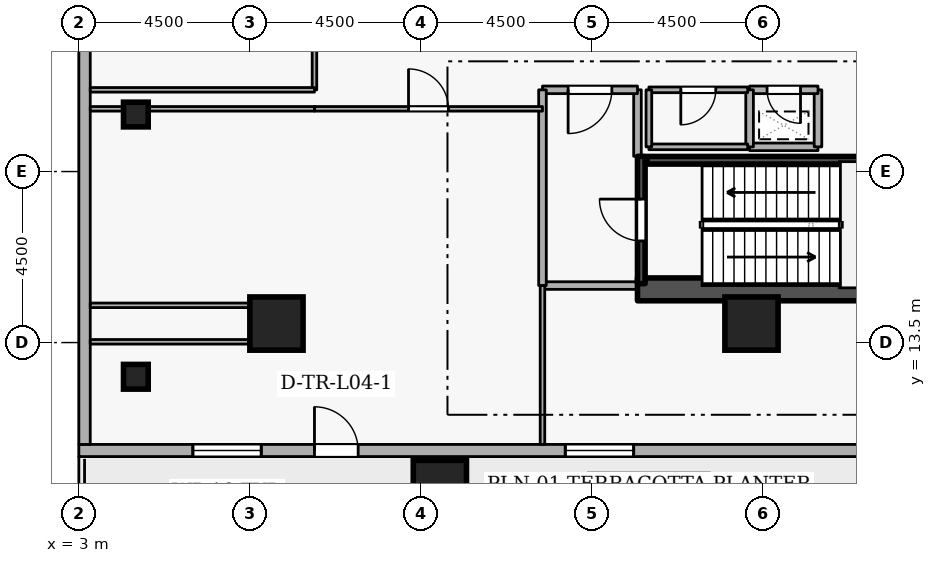
"""IFC4 building model, lengths in metres.
Left out: names, types, materials, properties, quantities, classifications, styles, units other than length and angle.
Written with IfcOpenShell. Run it as: python <this file> out.ifc"""

import sys

from ifc_helpers import new_model, si_unit, direction, frame, frame_2d, origin, origin_2d, place, context, subcontext, project, spatial, rectangle, extrude, element, fill, save


model = new_model("IFC4")
c1 = context("Model", 3, precision=1e-05, world=origin(), true_north=direction((0.0, 1.0)))
c2 = subcontext(c1, "Body", "Model", "MODEL_VIEW")
j1 = project(units=[si_unit("LENGTHUNIT", "METRE"), si_unit("PLANEANGLEUNIT", "RADIAN")], contexts=[c1])
p1 = place(None, origin())
s1 = spatial("IfcSite", under=j1, at=p1, CompositionType="ELEMENT")
p2 = place(p1, origin())
s2 = spatial("IfcBuilding", under=s1, at=p2, CompositionType="ELEMENT")
p3 = place(p2, frame((0.0, 0.0, 18.6)))
s3 = spatial("IfcBuildingStorey", under=s2, at=p3, CompositionType="ELEMENT", Elevation=18.6)
p4 = place(p3, frame((17.7, 14.9, 0.0), z_axis=(0.0, 0.0, 1.0), x_axis=(1.0, 0.0, 0.0)))
e1 = element("IfcWall", 1, at=p4, inside=s3, PredefinedType="SHEAR", context=c2, shape_type="SweptSolid", body=[
    extrude(rectangle(XDim=15.6, YDim=0.6, at=frame_2d((7.8, 0.0))), origin(), (0.0, 0.0, 1.0), 4.5),
])
for number, where, z_axis, x_axis in (
    (2, (12.5, 9.7, 0.0), (0.0, 0.0, 1.0), (1.0, 0.0, 0.0)),
    (3, (8.2, 14.0, 0.0), (0.0, 0.0, 1.0), (1.0, 0.0, 0.0)),
    (4, (20.7, 14.0, 0.0), (0.0, 0.0, 1.0), (1.0, 0.0, 0.0)),
):
    element("IfcColumn", number, at=place(p3, frame(where, z_axis=z_axis, x_axis=x_axis)), inside=s3, PredefinedType="COLUMN", context=c2, shape_type="SweptSolid", body=[
        extrude(rectangle(XDim=1.4, YDim=1.4, at=origin_2d()), origin(), (0.0, 0.0, 1.0), 4.5),
    ])
for number, where, z_axis, x_axis in (
    (5, (4.5, 12.6, 0.0), (0.0, 0.0, 1.0), (1.0, 0.0, 0.0)),
    (6, (4.5, 19.5, 0.0), (0.0, 0.0, 1.0), (1.0, 0.0, 0.0)),
):
    element("IfcColumn", number, at=place(p3, frame(where, z_axis=z_axis, x_axis=x_axis)), inside=s3, PredefinedType="COLUMN", context=c2, shape_type="SweptSolid", body=[
        extrude(rectangle(XDim=0.65, YDim=0.65, at=origin_2d()), origin(), (0.0, 0.0, 1.0), 4.5),
    ])
p5 = place(p3, frame((3.0, 10.66, 0.0), z_axis=(0.0, 0.0, 1.0), x_axis=(1.0, 0.0, 0.0)))
e7 = element("IfcWall", 7, at=p5, inside=s3, PredefinedType="STANDARD", context=c2, shape_type="SweptSolid", body=[
    extrude(rectangle(XDim=39.4, YDim=0.32, at=frame_2d((19.7, 0.0))), origin(), (0.0, 0.0, 1.0), 3.56),
])
p6 = place(p5, frame((6.2, 0.0, 0.0)))
e8 = element("IfcOpeningElement", 8, at=p6, cuts=e7, PredefinedType="OPENING", context=c2, shape_type="SweptSolid", body=[
    extrude(rectangle(XDim=1.15, YDim=2.1, at=frame_2d((0.575, 1.05))), frame((0.0, 0.17, 0.0), z_axis=(0.0, -1.0, 0.0), x_axis=(1.0, 0.0, 0.0)), (0.0, 0.0, 1.0), 0.34),
])
p7 = place(p5, frame((3.0, 0.0, 0.78)))
e9 = element("IfcOpeningElement", 9, at=p7, cuts=e7, PredefinedType="OPENING", context=c2, shape_type="SweptSolid", body=[
    extrude(rectangle(XDim=1.8, YDim=2.15, at=frame_2d((0.9, 1.075))), frame((0.0, 0.17, 0.0), z_axis=(0.0, -1.0, 0.0), x_axis=(1.0, 0.0, 0.0)), (0.0, 0.0, 1.0), 0.34),
])
p8 = place(p5, frame((12.8, 0.0, 0.78)))
e10 = element("IfcOpeningElement", 10, at=p8, cuts=e7, PredefinedType="OPENING", context=c2, shape_type="SweptSolid", body=[
    extrude(rectangle(XDim=1.8, YDim=2.15, at=frame_2d((0.9, 1.075))), frame((0.0, 0.17, 0.0), z_axis=(0.0, -1.0, 0.0), x_axis=(1.0, 0.0, 0.0)), (0.0, 0.0, 1.0), 0.34),
])
p9 = place(p5, frame((32.8, 0.0, 0.78)))
e11 = element("IfcOpeningElement", 11, at=p9, cuts=e7, PredefinedType="OPENING", context=c2, shape_type="SweptSolid", body=[
    extrude(rectangle(XDim=1.8, YDim=2.15, at=frame_2d((0.9, 1.075))), frame((0.0, 0.17, 0.0), z_axis=(0.0, -1.0, 0.0), x_axis=(1.0, 0.0, 0.0)), (0.0, 0.0, 1.0), 0.34),
])
p10 = place(p3, frame((3.15, 49.18, 0.0), z_axis=(0.0, 0.0, 1.0), x_axis=(0.0, -1.0, 0.0)))
e12 = element("IfcWall", 12, at=p10, inside=s3, PredefinedType="STANDARD", context=c2, shape_type="SweptSolid", body=[
    extrude(rectangle(XDim=38.36, YDim=0.3, at=frame_2d((19.18, 0.0))), origin(), (0.0, 0.0, 1.0), 3.56),
])
p11 = place(p3, frame((17.8, 15.05, 0.0), z_axis=(0.0, 0.0, 1.0), x_axis=(0.0, 1.0, 0.0)))
e13 = element("IfcWall", 13, at=p11, inside=s3, PredefinedType="SHEAR", context=c2, shape_type="SweptSolid", body=[
    extrude(rectangle(XDim=3.35, YDim=0.2, at=frame_2d((1.675, 0.0))), origin(), (0.0, 0.0, 1.0), 4.5),
])
p12 = place(p11, frame((1.125, 0.0, 0.0)))
e14 = element("IfcOpeningElement", 14, at=p12, cuts=e13, PredefinedType="OPENING", context=c2, shape_type="SweptSolid", body=[
    extrude(rectangle(XDim=1.1, YDim=2.1, at=frame_2d((0.55, 1.05))), frame((0.0, 0.11, 0.0), z_axis=(0.0, -1.0, 0.0), x_axis=(1.0, 0.0, 0.0)), (0.0, 0.0, 1.0), 0.22),
])
p13 = place(p3, frame((25.05, 18.297, 0.0), z_axis=(0.0, 0.0, 1.0), x_axis=(-1.0, 0.0, 0.0)))
e15 = element("IfcWall", 15, at=p13, inside=s3, PredefinedType="SHEAR", context=c2, shape_type="SweptSolid", body=[
    extrude(rectangle(XDim=7.1, YDim=0.2, at=frame_2d((3.55, 0.0))), origin(), (0.0, 0.0, 1.0), 4.5),
])
p14 = place(p3, frame((15.2, 15.0, 0.0), z_axis=(0.0, 0.0, 1.0), x_axis=(1.0, 0.0, 0.0)))
e16 = element("IfcWall", 16, at=p14, inside=s3, PredefinedType="STANDARD", context=c2, shape_type="SweptSolid", body=[
    extrude(rectangle(XDim=2.5, YDim=0.2, at=frame_2d((1.25, 0.0))), origin(), (0.0, 0.0, 1.0), 4.16),
])
p15 = place(p3, frame((17.7, 18.4, 0.0), z_axis=(0.0, 0.0, 1.0), x_axis=(0.0, 1.0, 0.0)))
e17 = element("IfcWall", 17, at=p15, inside=s3, PredefinedType="STANDARD", context=c2, shape_type="SweptSolid", body=[
    extrude(rectangle(XDim=1.75, YDim=0.2, at=frame_2d((0.875, 0.0))), origin(), (0.0, 0.0, 1.0), 3.365),
])
p16 = place(p3, frame((17.7, 20.15, 0.0), z_axis=(0.0, 0.0, 1.0), x_axis=(-1.0, 0.0, 0.0)))
e18 = element("IfcWall", 18, at=p16, inside=s3, PredefinedType="STANDARD", context=c2, shape_type="SweptSolid", body=[
    extrude(rectangle(XDim=2.5, YDim=0.2, at=frame_2d((1.25, 0.0))), origin(), (0.0, 0.0, 1.0), 4.16),
])
p17 = place(p16, frame((0.675, 0.0, 0.0)))
e19 = element("IfcOpeningElement", 19, at=p17, cuts=e18, PredefinedType="OPENING", context=c2, shape_type="SweptSolid", body=[
    extrude(rectangle(XDim=1.15, YDim=2.1, at=frame_2d((0.575, 1.05))), frame((0.0, 0.11, 0.0), z_axis=(0.0, -1.0, 0.0), x_axis=(1.0, 0.0, 0.0)), (0.0, 0.0, 1.0), 0.22),
])
p18 = place(p3, frame((15.2, 20.15, 0.0), z_axis=(0.0, 0.0, 1.0), x_axis=(0.0, -1.0, 0.0)))
e20 = element("IfcWall", 20, at=p18, inside=s3, PredefinedType="STANDARD", context=c2, shape_type="SweptSolid", body=[
    extrude(rectangle(XDim=5.15, YDim=0.2, at=frame_2d((2.575, 0.0))), origin(), (0.0, 0.0, 1.0), 4.16),
])
p19 = place(p3, frame((20.65, 18.65, 0.0), z_axis=(0.0, 0.0, 1.0), x_axis=(1.0, 0.0, 0.0)))
e21 = element("IfcWall", 21, at=p19, inside=s3, PredefinedType="STANDARD", context=c2, shape_type="SweptSolid", body=[
    extrude(rectangle(XDim=1.8, YDim=0.2, at=frame_2d((0.9, 0.0))), origin(), (0.0, 0.0, 1.0), 4.16),
])
p20 = place(p3, frame((22.45, 18.65, 0.0), z_axis=(0.0, 0.0, 1.0), x_axis=(0.0, 1.0, 0.0)))
e22 = element("IfcWall", 22, at=p20, inside=s3, PredefinedType="STANDARD", context=c2, shape_type="SweptSolid", body=[
    extrude(rectangle(XDim=1.5, YDim=0.2, at=frame_2d((0.75, 0.0))), origin(), (0.0, 0.0, 1.0), 4.16),
])
p21 = place(p3, frame((22.45, 20.15, 0.0), z_axis=(0.0, 0.0, 1.0), x_axis=(-1.0, 0.0, 0.0)))
e23 = element("IfcWall", 23, at=p21, inside=s3, PredefinedType="STANDARD", context=c2, shape_type="SweptSolid", body=[
    extrude(rectangle(XDim=1.8, YDim=0.2, at=frame_2d((0.9, 0.0))), origin(), (0.0, 0.0, 1.0), 4.16),
])
p22 = place(p21, frame((0.46, 0.0, 0.0)))
e24 = element("IfcOpeningElement", 24, at=p22, cuts=e23, PredefinedType="OPENING", context=c2, shape_type="SweptSolid", body=[
    extrude(rectangle(XDim=0.88, YDim=2.04, at=frame_2d((0.44, 1.02))), frame((0.0, 0.11, 0.0), z_axis=(0.0, -1.0, 0.0), x_axis=(1.0, 0.0, 0.0)), (0.0, 0.0, 1.0), 0.22),
])
p23 = place(p3, frame((20.65, 20.15, 0.0), z_axis=(0.0, 0.0, 1.0), x_axis=(0.0, -1.0, 0.0)))
e25 = element("IfcWall", 25, at=p23, inside=s3, PredefinedType="STANDARD", context=c2, shape_type="SweptSolid", body=[
    extrude(rectangle(XDim=1.5, YDim=0.2, at=frame_2d((0.75, 0.0))), origin(), (0.0, 0.0, 1.0), 4.16),
])
p24 = place(p3, frame((18.0, 18.65, 0.0), z_axis=(0.0, 0.0, 1.0), x_axis=(1.0, 0.0, 0.0)))
e26 = element("IfcWall", 26, at=p24, inside=s3, PredefinedType="PARTITIONING", context=c2, shape_type="SweptSolid", body=[
    extrude(rectangle(XDim=2.6, YDim=0.15, at=frame_2d((1.3, 0.0))), origin(), (0.0, 0.0, 1.0), 4.16),
])
p25 = place(p3, frame((20.6, 20.15, 0.0), z_axis=(0.0, 0.0, 1.0), x_axis=(-1.0, 0.0, 0.0)))
e27 = element("IfcWall", 27, at=p25, inside=s3, PredefinedType="PARTITIONING", context=c2, shape_type="SweptSolid", body=[
    extrude(rectangle(XDim=2.6, YDim=0.15, at=frame_2d((1.3, 0.0))), origin(), (0.0, 0.0, 1.0), 4.16),
])
p26 = place(p25, frame((0.84, 0.0, 0.0)))
e28 = element("IfcOpeningElement", 28, at=p26, cuts=e27, PredefinedType="OPENING", context=c2, shape_type="SweptSolid", body=[
    extrude(rectangle(XDim=0.92, YDim=2.08, at=frame_2d((0.46, 1.04))), frame((0.0, 0.085, 0.0), z_axis=(0.0, -1.0, 0.0), x_axis=(1.0, 0.0, 0.0)), (0.0, 0.0, 1.0), 0.17),
])
p27 = place(p3, frame((18.0, 20.15, 0.0), z_axis=(0.0, 0.0, 1.0), x_axis=(0.0, -1.0, 0.0)))
e29 = element("IfcWall", 29, at=p27, inside=s3, PredefinedType="PARTITIONING", context=c2, shape_type="SweptSolid", body=[
    extrude(rectangle(XDim=1.5, YDim=0.15, at=frame_2d((0.75, 0.0))), origin(), (0.0, 0.0, 1.0), 3.365),
])
p28 = place(p3, frame((9.2, 19.65, 0.0), z_axis=(0.0, 0.0, 1.0), x_axis=(1.0, 0.0, 0.0)))
e30 = element("IfcWall", 30, at=p28, inside=s3, PredefinedType="PARTITIONING", context=c2, shape_type="SweptSolid", body=[
    extrude(rectangle(XDim=6.0, YDim=0.12, at=frame_2d((3.0, 0.0))), origin(), (0.0, 0.0, 1.0), 4.16),
])
p29 = place(p28, frame((2.475, 0.0, 0.0)))
e31 = element("IfcOpeningElement", 31, at=p29, cuts=e30, PredefinedType="OPENING", context=c2, shape_type="SweptSolid", body=[
    extrude(rectangle(XDim=1.05, YDim=2.1, at=frame_2d((0.525, 1.05))), frame((0.0, 0.07, 0.0), z_axis=(0.0, -1.0, 0.0), x_axis=(1.0, 0.0, 0.0)), (0.0, 0.0, 1.0), 0.14),
])
p30 = place(p3, frame((15.2, 15.0, 0.0), z_axis=(0.0, 0.0, 1.0), x_axis=(0.0, -1.0, 0.0)))
e32 = element("IfcWall", 32, at=p30, inside=s3, PredefinedType="PARTITIONING", context=c2, shape_type="SweptSolid", body=[
    extrude(rectangle(XDim=4.18, YDim=0.12, at=frame_2d((2.09, 0.0))), origin(), (0.0, 0.0, 1.0), 4.16),
])
for number, where, z_axis, x_axis in (
    (33, (3.3, 13.52, 0.0), (0.0, 0.0, 1.0), (1.0, 0.0, 0.0)),
    (34, (8.2, 14.48, 0.0), (0.0, 0.0, 1.0), (-1.0, 0.0, 0.0)),
):
    element("IfcWall", number, at=place(p3, frame(where, z_axis=z_axis, x_axis=x_axis)), inside=s3, PredefinedType="PARTITIONING", context=c2, shape_type="SweptSolid", body=[
        extrude(rectangle(XDim=4.9, YDim=0.12, at=frame_2d((2.45, 0.0))), origin(), (0.0, 0.0, 1.0), 4.16),
    ])
p31 = place(p3, frame((3.3, 19.65, 0.0), z_axis=(0.0, 0.0, 1.0), x_axis=(1.0, 0.0, 0.0)))
e35 = element("IfcWall", 35, at=p31, inside=s3, PredefinedType="PARTITIONING", context=c2, shape_type="SweptSolid", body=[
    extrude(rectangle(XDim=5.9, YDim=0.12, at=frame_2d((2.95, 0.0))), origin(), (0.0, 0.0, 1.0), 4.16),
])
p32 = place(p3, frame((9.2, 21.4, 0.0), z_axis=(0.0, 0.0, 1.0), x_axis=(0.0, -1.0, 0.0)))
e36 = element("IfcWall", 36, at=p32, inside=s3, PredefinedType="PARTITIONING", context=c2, shape_type="SweptSolid", body=[
    extrude(rectangle(XDim=1.25, YDim=0.12, at=frame_2d((0.625, 0.0))), origin(), (0.0, 0.0, 1.0), 4.16),
])
p33 = place(p3, frame((9.2, 20.15, 0.0), z_axis=(0.0, 0.0, 1.0), x_axis=(-1.0, 0.0, 0.0)))
e37 = element("IfcWall", 37, at=p33, inside=s3, PredefinedType="PARTITIONING", context=c2, shape_type="SweptSolid", body=[
    extrude(rectangle(XDim=5.9, YDim=0.12, at=frame_2d((2.95, 0.0))), origin(), (0.0, 0.0, 1.0), 4.16),
])
p34 = place(p6, origin())
e38 = element("IfcDoor", 38, at=p34, inside=s3, OperationType="SINGLE_SWING_LEFT", PredefinedType="DOOR", context=c2, shape_type="SweptSolid", body=[
    extrude(rectangle(XDim=1.15, YDim=2.1, at=frame_2d((0.575, 1.05))), frame((0.0, 0.025, 0.0), z_axis=(0.0, -1.0, 0.0), x_axis=(1.0, 0.0, 0.0)), (0.0, 0.0, 1.0), 0.05),
])
fill(e8, e38)
p35 = place(p7, origin())
e39 = element("IfcWindow", 39, at=p35, inside=s3, PartitioningType="SINGLE_PANEL", PredefinedType="WINDOW", context=c2, shape_type="SweptSolid", body=[
    extrude(rectangle(XDim=1.8, YDim=2.15, at=frame_2d((0.9, 1.075))), frame((0.0, 0.03, 0.0), z_axis=(0.0, -1.0, 0.0), x_axis=(1.0, 0.0, 0.0)), (0.0, 0.0, 1.0), 0.06),
])
fill(e9, e39)
p36 = place(p8, origin())
e40 = element("IfcWindow", 40, at=p36, inside=s3, PartitioningType="SINGLE_PANEL", PredefinedType="WINDOW", context=c2, shape_type="SweptSolid", body=[
    extrude(rectangle(XDim=1.8, YDim=2.15, at=frame_2d((0.9, 1.075))), frame((0.0, 0.03, 0.0), z_axis=(0.0, -1.0, 0.0), x_axis=(1.0, 0.0, 0.0)), (0.0, 0.0, 1.0), 0.06),
])
fill(e10, e40)
p37 = place(p12, origin())
e41 = element("IfcDoor", 41, at=p37, inside=s3, OperationType="SINGLE_SWING_RIGHT", PredefinedType="DOOR", context=c2, shape_type="SweptSolid", body=[
    extrude(rectangle(XDim=1.1, YDim=2.1, at=frame_2d((0.55, 1.05))), frame((0.0, 0.025, 0.0), z_axis=(0.0, -1.0, 0.0), x_axis=(1.0, 0.0, 0.0)), (0.0, 0.0, 1.0), 0.05),
])
fill(e14, e41)
p38 = place(p17, origin())
e42 = element("IfcDoor", 42, at=p38, inside=s3, OperationType="SINGLE_SWING_RIGHT", PredefinedType="DOOR", context=c2, shape_type="SweptSolid", body=[
    extrude(rectangle(XDim=1.15, YDim=2.1, at=frame_2d((0.575, 1.05))), frame((0.0, 0.025, 0.0), z_axis=(0.0, -1.0, 0.0), x_axis=(1.0, 0.0, 0.0)), (0.0, 0.0, 1.0), 0.05),
])
fill(e19, e42)
p39 = place(p22, origin())
e43 = element("IfcDoor", 43, at=p39, inside=s3, OperationType="SINGLE_SWING_LEFT", PredefinedType="DOOR", context=c2, shape_type="SweptSolid", body=[
    extrude(rectangle(XDim=0.88, YDim=2.04, at=frame_2d((0.44, 1.02))), frame((0.0, 0.025, 0.0), z_axis=(0.0, -1.0, 0.0), x_axis=(1.0, 0.0, 0.0)), (0.0, 0.0, 1.0), 0.05),
])
fill(e24, e43)
p40 = place(p26, origin())
e44 = element("IfcDoor", 44, at=p40, inside=s3, OperationType="SINGLE_SWING_RIGHT", PredefinedType="DOOR", context=c2, shape_type="SweptSolid", body=[
    extrude(rectangle(XDim=0.92, YDim=2.08, at=frame_2d((0.46, 1.04))), frame((0.0, 0.025, 0.0), z_axis=(0.0, -1.0, 0.0), x_axis=(1.0, 0.0, 0.0)), (0.0, 0.0, 1.0), 0.05),
])
fill(e28, e44)
p41 = place(p29, origin())
e45 = element("IfcDoor", 45, at=p41, inside=s3, OperationType="SINGLE_SWING_LEFT", PredefinedType="DOOR", context=c2, shape_type="SweptSolid", body=[
    extrude(rectangle(XDim=1.05, YDim=2.1, at=frame_2d((0.525, 1.05))), frame((0.0, 0.025, 0.0), z_axis=(0.0, -1.0, 0.0), x_axis=(1.0, 0.0, 0.0)), (0.0, 0.0, 1.0), 0.05),
])
fill(e31, e45)
save(model, sys.argv[1])
